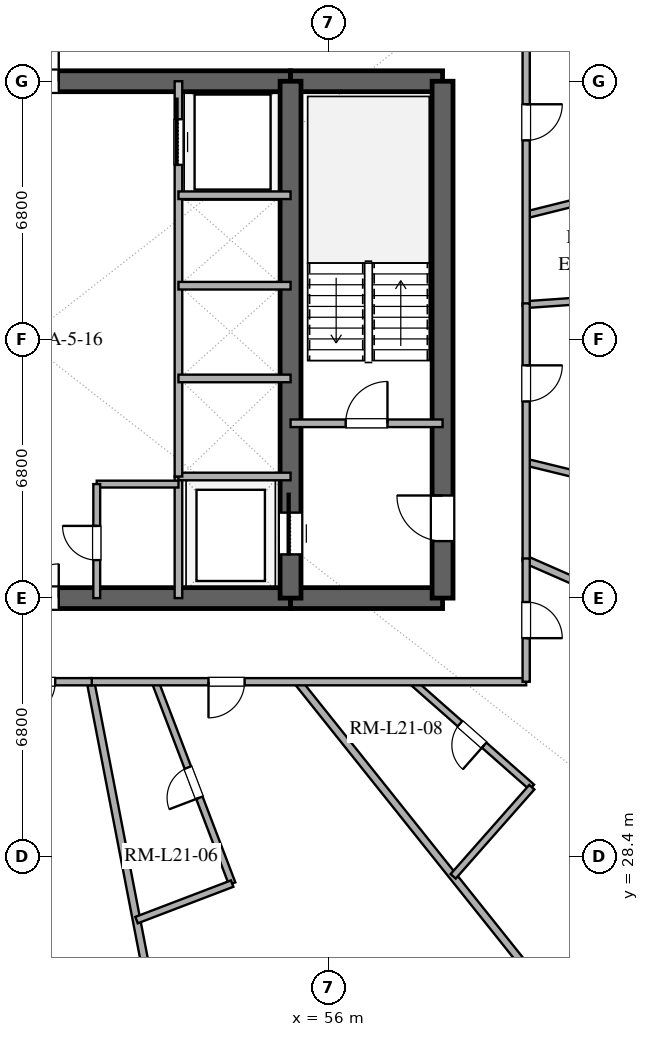
"""IFC4 building model, lengths in metres.
Left out: names, types, materials, properties, quantities, classifications, styles, units other than length and angle.
Written with IfcOpenShell. Run it as: python <this file> out.ifc"""

import sys

from ifc_helpers import new_model, si_unit, direction, frame, frame_2d, origin, place, context, subcontext, project, spatial, rectangle, extrude, element, fill, save


model = new_model("IFC4")
c1 = context("Model", 3, precision=1e-05, world=origin(), true_north=direction((0.0, 1.0)))
c2 = subcontext(c1, "Body", "Model", "MODEL_VIEW")
j1 = project(units=[si_unit("LENGTHUNIT", "METRE"), si_unit("PLANEANGLEUNIT", "RADIAN")], contexts=[c1])
p1 = place(None, origin())
s1 = spatial("IfcSite", under=j1, at=p1, CompositionType="ELEMENT")
p2 = place(p1, origin())
s2 = spatial("IfcBuilding", under=s1, at=p2, CompositionType="ELEMENT")
p3 = place(p2, frame((0.0, 0.0, 87.6)))
s3 = spatial("IfcBuildingStorey", under=s2, at=p3, CompositionType="ELEMENT", Elevation=87.6)
p4 = place(p3, frame((41.0, 35.2, 0.0), z_axis=(0.0, 0.0, 1.0), x_axis=(1.0, 0.0, 0.0)))
e1 = element("IfcWall", 1, at=p4, inside=s3, PredefinedType="SHEAR", context=c2, shape_type="SweptSolid", body=[
    extrude(rectangle(XDim=14.0, YDim=0.55, at=frame_2d((7.0, 0.0))), origin(), (0.0, 0.0, 1.0), 3.38),
])
p5 = place(p4, frame((6.1, 0.0, 0.0)))
e2 = element("IfcOpeningElement", 2, at=p5, cuts=e1, PredefinedType="OPENING", context=c2, shape_type="SweptSolid", body=[
    extrude(rectangle(XDim=1.8, YDim=2.25, at=frame_2d((0.9, 1.125))), frame((0.0, 0.285, 0.0), z_axis=(0.0, -1.0, 0.0), x_axis=(1.0, 0.0, 0.0)), (0.0, 0.0, 1.0), 0.57),
])
p6 = place(p3, frame((55.0, 35.2, 0.0), z_axis=(0.0, 0.0, 1.0), x_axis=(1.0, 0.0, 0.0)))
e3 = element("IfcWall", 3, at=p6, inside=s3, PredefinedType="SHEAR", context=c2, shape_type="SweptSolid", body=[
    extrude(rectangle(XDim=4.0, YDim=0.55, at=frame_2d((2.0, 0.0))), origin(), (0.0, 0.0, 1.0), 3.38),
])
p7 = place(p3, frame((41.0, 48.8, 0.0), z_axis=(0.0, 0.0, 1.0), x_axis=(1.0, 0.0, 0.0)))
e4 = element("IfcWall", 4, at=p7, inside=s3, PredefinedType="SHEAR", context=c2, shape_type="SweptSolid", body=[
    extrude(rectangle(XDim=14.0, YDim=0.55, at=frame_2d((7.0, 0.0))), origin(), (0.0, 0.0, 1.0), 3.38),
])
p8 = place(p7, frame((6.1, 0.0, 0.0)))
e5 = element("IfcOpeningElement", 5, at=p8, cuts=e4, PredefinedType="OPENING", context=c2, shape_type="SweptSolid", body=[
    extrude(rectangle(XDim=1.8, YDim=2.25, at=frame_2d((0.9, 1.125))), frame((0.0, 0.285, 0.0), z_axis=(0.0, -1.0, 0.0), x_axis=(1.0, 0.0, 0.0)), (0.0, 0.0, 1.0), 0.57),
])
p9 = place(p3, frame((55.0, 48.8, 0.0), z_axis=(0.0, 0.0, 1.0), x_axis=(1.0, 0.0, 0.0)))
e6 = element("IfcWall", 6, at=p9, inside=s3, PredefinedType="SHEAR", context=c2, shape_type="SweptSolid", body=[
    extrude(rectangle(XDim=4.0, YDim=0.55, at=frame_2d((2.0, 0.0))), origin(), (0.0, 0.0, 1.0), 3.38),
])
p10 = place(p3, frame((59.0, 35.2, 0.0), z_axis=(0.0, 0.0, 1.0), x_axis=(0.0, 1.0, 0.0)))
e7 = element("IfcWall", 7, at=p10, inside=s3, PredefinedType="SHEAR", context=c2, shape_type="SweptSolid", body=[
    extrude(rectangle(XDim=13.6, YDim=0.55, at=frame_2d((6.8, 0.0))), origin(), (0.0, 0.0, 1.0), 3.38),
])
p11 = place(p10, frame((1.5, 0.0, 0.0)))
e8 = element("IfcOpeningElement", 8, at=p11, cuts=e7, PredefinedType="OPENING", context=c2, shape_type="SweptSolid", body=[
    extrude(rectangle(XDim=1.2, YDim=2.15, at=frame_2d((0.6, 1.075))), frame((0.0, 0.285, 0.0), z_axis=(0.0, -1.0, 0.0), x_axis=(1.0, 0.0, 0.0)), (0.0, 0.0, 1.0), 0.57),
])
p12 = place(p3, frame((55.0, 35.2, 0.0), z_axis=(0.0, 0.0, 1.0), x_axis=(0.0, 1.0, 0.0)))
e9 = element("IfcWall", 9, at=p12, inside=s3, PredefinedType="SHEAR", context=c2, shape_type="SweptSolid", body=[
    extrude(rectangle(XDim=13.6, YDim=0.55, at=frame_2d((6.8, 0.0))), origin(), (0.0, 0.0, 1.0), 3.38),
])
p13 = place(p12, frame((1.15, 0.0, 0.0)))
e10 = element("IfcOpeningElement", 10, at=p13, cuts=e9, PredefinedType="OPENING", context=c2, shape_type="SweptSolid", body=[
    extrude(rectangle(XDim=1.1, YDim=2.2, at=frame_2d((0.55, 1.1))), frame((0.0, 0.285, 0.0), z_axis=(0.0, -1.0, 0.0), x_axis=(1.0, 0.0, 0.0)), (0.0, 0.0, 1.0), 0.57),
])
p14 = place(p3, frame((55.0, 39.8, 0.0), z_axis=(0.0, 0.0, 1.0), x_axis=(1.0, 0.0, 0.0)))
e11 = element("IfcWall", 11, at=p14, inside=s3, PredefinedType="SOLIDWALL", context=c2, shape_type="SweptSolid", body=[
    extrude(rectangle(XDim=4.0, YDim=0.2, at=frame_2d((2.0, 0.0))), origin(), (0.0, 0.0, 1.0), 2.74),
])
p15 = place(p14, frame((1.45, 0.0, 0.0)))
e12 = element("IfcOpeningElement", 12, at=p15, cuts=e11, PredefinedType="OPENING", context=c2, shape_type="SweptSolid", body=[
    extrude(rectangle(XDim=1.1, YDim=2.15, at=frame_2d((0.55, 1.075))), frame((0.0, 0.11, 0.0), z_axis=(0.0, -1.0, 0.0), x_axis=(1.0, 0.0, 0.0)), (0.0, 0.0, 1.0), 0.22),
])
p16 = place(p3, frame((52.05, 35.2, 0.0), z_axis=(0.0, 0.0, 1.0), x_axis=(0.0, 1.0, 0.0)))
e13 = element("IfcWall", 13, at=p16, inside=s3, PredefinedType="SOLIDWALL", context=c2, shape_type="SweptSolid", body=[
    extrude(rectangle(XDim=3.2, YDim=0.2, at=frame_2d((1.6, 0.0))), origin(), (0.0, 0.0, 1.0), 2.74),
])
p17 = place(p3, frame((52.05, 38.4, 0.0), z_axis=(0.0, 0.0, 1.0), x_axis=(1.0, 0.0, 0.0)))
e14 = element("IfcWall", 14, at=p17, inside=s3, PredefinedType="SOLIDWALL", context=c2, shape_type="SweptSolid", body=[
    extrude(rectangle(XDim=2.95, YDim=0.2, at=frame_2d((1.475, 0.0))), origin(), (0.0, 0.0, 1.0), 2.74),
])
p18 = place(p3, frame((52.05, 38.4, 0.0), z_axis=(0.0, 0.0, 1.0), x_axis=(0.0, 1.0, 0.0)))
e15 = element("IfcWall", 15, at=p18, inside=s3, PredefinedType="SOLIDWALL", context=c2, shape_type="SweptSolid", body=[
    extrude(rectangle(XDim=10.4, YDim=0.2, at=frame_2d((5.2, 0.0))), origin(), (0.0, 0.0, 1.0), 2.74),
])
p19 = place(p18, frame((8.2, 0.0, 0.0)))
e16 = element("IfcOpeningElement", 16, at=p19, cuts=e15, PredefinedType="OPENING", context=c2, shape_type="SweptSolid", body=[
    extrude(rectangle(XDim=1.2, YDim=2.2, at=frame_2d((0.6, 1.1))), frame((0.0, 0.11, 0.0), z_axis=(0.0, -1.0, 0.0), x_axis=(1.0, 0.0, 0.0)), (0.0, 0.0, 1.0), 0.22),
])
for number, where, z_axis, x_axis in (
    (17, (52.05, 40.98, 0.0), (0.0, 0.0, 1.0), (1.0, 0.0, 0.0)),
    (18, (52.05, 43.42, 0.0), (0.0, 0.0, 1.0), (1.0, 0.0, 0.0)),
    (19, (52.05, 45.8, 0.0), (0.0, 0.0, 1.0), (1.0, 0.0, 0.0)),
):
    element("IfcWall", number, at=place(p3, frame(where, z_axis=z_axis, x_axis=x_axis)), inside=s3, PredefinedType="SOLIDWALL", context=c2, shape_type="SweptSolid", body=[
        extrude(rectangle(XDim=2.95, YDim=0.2, at=frame_2d((1.475, 0.0))), origin(), (0.0, 0.0, 1.0), 2.74),
    ])
p20 = place(p3, frame((49.9, 38.2, 0.0), z_axis=(0.0, 0.0, 1.0), x_axis=(1.0, 0.0, 0.0)))
e20 = element("IfcWall", 20, at=p20, inside=s3, PredefinedType="PLUMBINGWALL", context=c2, shape_type="SweptSolid", body=[
    extrude(rectangle(XDim=2.15, YDim=0.18, at=frame_2d((1.075, 0.0))), origin(), (0.0, 0.0, 1.0), 2.74),
])
p21 = place(p3, frame((49.9, 35.2, 0.0), z_axis=(0.0, 0.0, 1.0), x_axis=(0.0, 1.0, 0.0)))
e21 = element("IfcWall", 21, at=p21, inside=s3, PredefinedType="PLUMBINGWALL", context=c2, shape_type="SweptSolid", body=[
    extrude(rectangle(XDim=3.0, YDim=0.18, at=frame_2d((1.5, 0.0))), origin(), (0.0, 0.0, 1.0), 2.74),
])
p22 = place(p21, frame((1.0, 0.0, 0.0)))
e22 = element("IfcOpeningElement", 22, at=p22, cuts=e21, PredefinedType="OPENING", context=c2, shape_type="SweptSolid", body=[
    extrude(rectangle(XDim=0.9, YDim=2.1, at=frame_2d((0.45, 1.05))), frame((0.0, 0.1, 0.0), z_axis=(0.0, -1.0, 0.0), x_axis=(1.0, 0.0, 0.0)), (0.0, 0.0, 1.0), 0.2),
])
p23 = place(p3, frame((68.224, 43.414, 0.0), z_axis=(0.0, 0.0, 1.0), x_axis=(-0.997563891584, -0.06975874287, 0.0)))
e23 = element("IfcWall", 23, at=p23, inside=s3, PredefinedType="PLUMBINGWALL", context=c2, shape_type="SweptSolid", body=[
    extrude(rectangle(XDim=7.042, YDim=0.18, at=frame_2d((3.521, 0.0))), origin(), (0.0, 0.0, 1.0), 2.74),
])
p24 = place(p3, frame((49.737, 33.0, 0.0), z_axis=(0.0, 0.0, 1.0), x_axis=(0.18949034594, -0.981882584017, 0.0)))
e24 = element("IfcWall", 24, at=p24, inside=s3, PredefinedType="PARTITIONING", context=c2, shape_type="SweptSolid", body=[
    extrude(rectangle(XDim=13.153, YDim=0.2, at=frame_2d((6.577, 0.0))), origin(), (0.0, 0.0, 1.0), 2.74),
])
p25 = place(p3, frame((61.2, 36.208, 0.0), z_axis=(0.0, 0.0, 1.0), x_axis=(0.915722078144, -0.401812239235, 0.0)))
e25 = element("IfcWall", 25, at=p25, inside=s3, PredefinedType="PARTITIONING", context=c2, shape_type="SweptSolid", body=[
    extrude(rectangle(XDim=12.915, YDim=0.2, at=frame_2d((6.458, 0.0))), origin(), (0.0, 0.0, 1.0), 2.74),
])
p26 = place(p3, frame((67.699, 37.189, 0.0), z_axis=(0.0, 0.0, 1.0), x_axis=(-0.971448370468, 0.237251055878, 0.0)))
e26 = element("IfcWall", 26, at=p26, inside=s3, PredefinedType="PLUMBINGWALL", context=c2, shape_type="SweptSolid", body=[
    extrude(rectangle(XDim=6.69, YDim=0.18, at=frame_2d((3.345, 0.0))), origin(), (0.0, 0.0, 1.0), 2.74),
])
p27 = place(p26, frame((2.92, 0.0, 0.0)))
e27 = element("IfcOpeningElement", 27, at=p27, cuts=e26, PredefinedType="OPENING", context=c2, shape_type="SweptSolid", body=[
    extrude(rectangle(XDim=0.85, YDim=2.1, at=frame_2d((0.425, 1.05))), frame((0.0, 0.1, 0.0), z_axis=(0.0, -1.0, 0.0), x_axis=(1.0, 0.0, 0.0)), (0.0, 0.0, 1.0), 0.2),
])
p28 = place(p3, frame((55.189, 33.0, 0.0), z_axis=(0.0, 0.0, 1.0), x_axis=(0.624085468444, -0.781356082767, 0.0)))
e28 = element("IfcWall", 28, at=p28, inside=s3, PredefinedType="PARTITIONING", context=c2, shape_type="SweptSolid", body=[
    extrude(rectangle(XDim=12.703, YDim=0.2, at=frame_2d((6.352, 0.0))), origin(), (0.0, 0.0, 1.0), 2.74),
])
p29 = place(p3, frame((61.2, 45.284, 0.0), z_axis=(0.0, 0.0, 1.0), x_axis=(0.970426102609, 0.241398383125, 0.0)))
e29 = element("IfcWall", 29, at=p29, inside=s3, PredefinedType="PLUMBINGWALL", context=c2, shape_type="SweptSolid", body=[
    extrude(rectangle(XDim=6.365, YDim=0.18, at=frame_2d((3.183, 0.0))), origin(), (0.0, 0.0, 1.0), 2.74),
])
p30 = place(p29, frame((2.758, 0.0, 0.0)))
e30 = element("IfcOpeningElement", 30, at=p30, cuts=e29, PredefinedType="OPENING", context=c2, shape_type="SweptSolid", body=[
    extrude(rectangle(XDim=0.85, YDim=2.1, at=frame_2d((0.425, 1.05))), frame((0.0, 0.1, 0.0), z_axis=(0.0, -1.0, 0.0), x_axis=(1.0, 0.0, 0.0)), (0.0, 0.0, 1.0), 0.2),
])
p31 = place(p3, frame((53.463, 27.688, 0.0), z_axis=(0.0, 0.0, 1.0), x_axis=(-0.356604128264, 0.934255583716, 0.0)))
e31 = element("IfcWall", 31, at=p31, inside=s3, PredefinedType="PLUMBINGWALL", context=c2, shape_type="SweptSolid", body=[
    extrude(rectangle(XDim=5.686, YDim=0.18, at=frame_2d((2.843, 0.0))), origin(), (0.0, 0.0, 1.0), 2.74),
])
p32 = place(p31, frame((2.418, 0.0, 0.0)))
e32 = element("IfcOpeningElement", 32, at=p32, cuts=e31, PredefinedType="OPENING", context=c2, shape_type="SweptSolid", body=[
    extrude(rectangle(XDim=0.85, YDim=2.1, at=frame_2d((0.425, 1.05))), frame((0.0, 0.1, 0.0), z_axis=(0.0, -1.0, 0.0), x_axis=(1.0, 0.0, 0.0)), (0.0, 0.0, 1.0), 0.2),
])
p33 = place(p3, frame((61.2, 51.0, 0.0), z_axis=(0.0, 0.0, 1.0), x_axis=(0.0, -1.0, 0.0)))
e33 = element("IfcWall", 33, at=p33, inside=s3, PredefinedType="PARTITIONING", context=c2, shape_type="SweptSolid", body=[
    extrude(rectangle(XDim=8.109, YDim=0.19, at=frame_2d((4.055, 0.0))), origin(), (0.0, 0.0, 1.0), 2.74),
])
p34 = place(p33, frame((2.806, 0.0, 0.0)))
e34 = element("IfcOpeningElement", 34, at=p34, cuts=e33, PredefinedType="OPENING", context=c2, shape_type="SweptSolid", body=[
    extrude(rectangle(XDim=0.95, YDim=2.15, at=frame_2d((0.475, 1.075))), frame((0.0, 0.105, 0.0), z_axis=(0.0, -1.0, 0.0), x_axis=(1.0, 0.0, 0.0)), (0.0, 0.0, 1.0), 0.21),
])
p35 = place(p3, frame((61.2, 42.955, 0.0), z_axis=(0.0, 0.0, 1.0), x_axis=(0.0, -1.0, 0.0)))
e35 = element("IfcWall", 35, at=p35, inside=s3, PredefinedType="PARTITIONING", context=c2, shape_type="SweptSolid", body=[
    extrude(rectangle(XDim=6.782, YDim=0.19, at=frame_2d((3.391, 0.0))), origin(), (0.0, 0.0, 1.0), 2.74),
])
p36 = place(p35, frame((1.631, 0.0, 0.0)))
e36 = element("IfcOpeningElement", 36, at=p36, cuts=e35, PredefinedType="OPENING", context=c2, shape_type="SweptSolid", body=[
    extrude(rectangle(XDim=0.95, YDim=2.15, at=frame_2d((0.475, 1.075))), frame((0.0, 0.105, 0.0), z_axis=(0.0, -1.0, 0.0), x_axis=(1.0, 0.0, 0.0)), (0.0, 0.0, 1.0), 0.21),
])
p37 = place(p3, frame((61.348, 30.225, 0.0), z_axis=(0.0, 0.0, 1.0), x_axis=(-0.749931272561, 0.661515749197, 0.0)))
e37 = element("IfcWall", 37, at=p37, inside=s3, PredefinedType="PLUMBINGWALL", context=c2, shape_type="SweptSolid", body=[
    extrude(rectangle(XDim=4.194, YDim=0.18, at=frame_2d((2.097, 0.0))), origin(), (0.0, 0.0, 1.0), 2.74),
])
p38 = place(p37, frame((1.672, 0.0, 0.0)))
e38 = element("IfcOpeningElement", 38, at=p38, cuts=e37, PredefinedType="OPENING", context=c2, shape_type="SweptSolid", body=[
    extrude(rectangle(XDim=0.85, YDim=2.1, at=frame_2d((0.425, 1.05))), frame((0.0, 0.1, 0.0), z_axis=(0.0, -1.0, 0.0), x_axis=(1.0, 0.0, 0.0)), (0.0, 0.0, 1.0), 0.2),
])
p39 = place(p3, frame((61.2, 33.0, 0.0), z_axis=(0.0, 0.0, 1.0), x_axis=(-1.0, 0.0, 0.0)))
e39 = element("IfcWall", 39, at=p39, inside=s3, PredefinedType="PARTITIONING", context=c2, shape_type="SweptSolid", body=[
    extrude(rectangle(XDim=11.496, YDim=0.19, at=frame_2d((5.748, 0.0))), origin(), (0.0, 0.0, 1.0), 2.74),
])
p40 = place(p39, frame((7.41, 0.0, 0.0)))
e40 = element("IfcOpeningElement", 40, at=p40, cuts=e39, PredefinedType="OPENING", context=c2, shape_type="SweptSolid", body=[
    extrude(rectangle(XDim=0.95, YDim=2.15, at=frame_2d((0.475, 1.075))), frame((0.0, 0.105, 0.0), z_axis=(0.0, -1.0, 0.0), x_axis=(1.0, 0.0, 0.0)), (0.0, 0.0, 1.0), 0.21),
])
p41 = place(p3, frame((61.2, 36.243, 0.0), z_axis=(0.0, 0.0, 1.0), x_axis=(0.0, -1.0, 0.0)))
e41 = element("IfcWall", 41, at=p41, inside=s3, PredefinedType="PARTITIONING", context=c2, shape_type="SweptSolid", body=[
    extrude(rectangle(XDim=3.243, YDim=0.19, at=frame_2d((1.621, 0.0))), origin(), (0.0, 0.0, 1.0), 2.74),
])
p42 = place(p41, frame((1.146, 0.0, 0.0)))
e42 = element("IfcOpeningElement", 42, at=p42, cuts=e41, PredefinedType="OPENING", context=c2, shape_type="SweptSolid", body=[
    extrude(rectangle(XDim=0.95, YDim=2.15, at=frame_2d((0.475, 1.075))), frame((0.0, 0.105, 0.0), z_axis=(0.0, -1.0, 0.0), x_axis=(1.0, 0.0, 0.0)), (0.0, 0.0, 1.0), 0.21),
])
p43 = place(p3, frame((59.279, 27.879, 0.0), z_axis=(0.0, 0.0, 1.0), x_axis=(0.661515810511, 0.749931218475, 0.0)))
e43 = element("IfcWall", 43, at=p43, inside=s3, PredefinedType="PLUMBINGWALL", context=c2, shape_type="SweptSolid", body=[
    extrude(rectangle(XDim=3.129, YDim=0.18, at=frame_2d((1.564, 0.0))), origin(), (0.0, 0.0, 1.0), 2.74),
])
p44 = place(p3, frame((49.77, 33.0, 0.0), z_axis=(0.0, 0.0, 1.0), x_axis=(-1.0, 0.0, 0.0)))
e44 = element("IfcWall", 44, at=p44, inside=s3, PredefinedType="PARTITIONING", context=c2, shape_type="SweptSolid", body=[
    extrude(rectangle(XDim=2.875, YDim=0.19, at=frame_2d((1.438, 0.0))), origin(), (0.0, 0.0, 1.0), 2.74),
])
p45 = place(p44, frame((0.962, 0.0, 0.0)))
e45 = element("IfcOpeningElement", 45, at=p45, cuts=e44, PredefinedType="OPENING", context=c2, shape_type="SweptSolid", body=[
    extrude(rectangle(XDim=0.95, YDim=2.15, at=frame_2d((0.475, 1.075))), frame((0.0, 0.105, 0.0), z_axis=(0.0, -1.0, 0.0), x_axis=(1.0, 0.0, 0.0)), (0.0, 0.0, 1.0), 0.21),
])
p46 = place(p3, frame((50.948, 26.728, 0.0), z_axis=(0.0, 0.0, 1.0), x_axis=(0.934244754769, 0.35663249738, 0.0)))
e46 = element("IfcWall", 46, at=p46, inside=s3, PredefinedType="PLUMBINGWALL", context=c2, shape_type="SweptSolid", body=[
    extrude(rectangle(XDim=2.692, YDim=0.18, at=frame_2d((1.346, 0.0))), origin(), (0.0, 0.0, 1.0), 2.74),
])
p47 = place(p13, origin())
e47 = element("IfcDoor", 47, at=p47, inside=s3, OperationType="SLIDING_TO_RIGHT", PredefinedType="DOOR", context=c2, shape_type="SweptSolid", body=[
    extrude(rectangle(XDim=1.1, YDim=2.2, at=frame_2d((0.55, 1.1))), frame((0.0, 0.025, 0.0), z_axis=(0.0, -1.0, 0.0), x_axis=(1.0, 0.0, 0.0)), (0.0, 0.0, 1.0), 0.05),
])
fill(e10, e47)
p48 = place(p11, origin())
e48 = element("IfcDoor", 48, at=p48, inside=s3, OperationType="SINGLE_SWING_RIGHT", PredefinedType="DOOR", context=c2, shape_type="SweptSolid", body=[
    extrude(rectangle(XDim=1.2, YDim=2.15, at=frame_2d((0.6, 1.075))), frame((0.0, 0.025, 0.0), z_axis=(0.0, -1.0, 0.0), x_axis=(1.0, 0.0, 0.0)), (0.0, 0.0, 1.0), 0.05),
])
fill(e8, e48)
p49 = place(p5, origin())
e49 = element("IfcDoor", 49, at=p49, inside=s3, OperationType="DOUBLE_DOOR_SINGLE_SWING", PredefinedType="DOOR", context=c2, shape_type="SweptSolid", body=[
    extrude(rectangle(XDim=1.8, YDim=2.25, at=frame_2d((0.9, 1.125))), frame((0.0, 0.025, 0.0), z_axis=(0.0, -1.0, 0.0), x_axis=(1.0, 0.0, 0.0)), (0.0, 0.0, 1.0), 0.05),
])
fill(e2, e49)
p50 = place(p8, origin())
e50 = element("IfcDoor", 50, at=p50, inside=s3, OperationType="DOUBLE_DOOR_SINGLE_SWING", PredefinedType="DOOR", context=c2, shape_type="SweptSolid", body=[
    extrude(rectangle(XDim=1.8, YDim=2.25, at=frame_2d((0.9, 1.125))), frame((0.0, 0.025, 0.0), z_axis=(0.0, -1.0, 0.0), x_axis=(1.0, 0.0, 0.0)), (0.0, 0.0, 1.0), 0.05),
])
fill(e5, e50)
p51 = place(p15, origin())
e51 = element("IfcDoor", 51, at=p51, inside=s3, OperationType="SINGLE_SWING_RIGHT", PredefinedType="DOOR", context=c2, shape_type="SweptSolid", body=[
    extrude(rectangle(XDim=1.1, YDim=2.15, at=frame_2d((0.55, 1.075))), frame((0.0, 0.025, 0.0), z_axis=(0.0, -1.0, 0.0), x_axis=(1.0, 0.0, 0.0)), (0.0, 0.0, 1.0), 0.05),
])
fill(e12, e51)
p52 = place(p19, origin())
e52 = element("IfcDoor", 52, at=p52, inside=s3, OperationType="SLIDING_TO_RIGHT", PredefinedType="DOOR", context=c2, shape_type="SweptSolid", body=[
    extrude(rectangle(XDim=1.2, YDim=2.2, at=frame_2d((0.6, 1.1))), frame((0.0, 0.025, 0.0), z_axis=(0.0, -1.0, 0.0), x_axis=(1.0, 0.0, 0.0)), (0.0, 0.0, 1.0), 0.05),
])
fill(e16, e52)
p53 = place(p22, origin())
e53 = element("IfcDoor", 53, at=p53, inside=s3, OperationType="SINGLE_SWING_RIGHT", PredefinedType="DOOR", context=c2, shape_type="SweptSolid", body=[
    extrude(rectangle(XDim=0.9, YDim=2.1, at=frame_2d((0.45, 1.05))), frame((0.0, 0.025, 0.0), z_axis=(0.0, -1.0, 0.0), x_axis=(1.0, 0.0, 0.0)), (0.0, 0.0, 1.0), 0.05),
])
fill(e22, e53)
p54 = place(p32, origin())
e54 = element("IfcDoor", 54, at=p54, inside=s3, OperationType="SINGLE_SWING_LEFT", PredefinedType="DOOR", context=c2, shape_type="SweptSolid", body=[
    extrude(rectangle(XDim=0.85, YDim=2.1, at=frame_2d((0.425, 1.05))), frame((0.0, 0.025, 0.0), z_axis=(0.0, -1.0, 0.0), x_axis=(1.0, 0.0, 0.0)), (0.0, 0.0, 1.0), 0.05),
])
fill(e32, e54)
p55 = place(p34, origin())
e55 = element("IfcDoor", 55, at=p55, inside=s3, OperationType="SINGLE_SWING_LEFT", PredefinedType="DOOR", context=c2, shape_type="SweptSolid", body=[
    extrude(rectangle(XDim=0.95, YDim=2.15, at=frame_2d((0.475, 1.075))), frame((0.0, 0.025, 0.0), z_axis=(0.0, -1.0, 0.0), x_axis=(1.0, 0.0, 0.0)), (0.0, 0.0, 1.0), 0.05),
])
fill(e34, e55)
p56 = place(p36, origin())
e56 = element("IfcDoor", 56, at=p56, inside=s3, OperationType="SINGLE_SWING_LEFT", PredefinedType="DOOR", context=c2, shape_type="SweptSolid", body=[
    extrude(rectangle(XDim=0.95, YDim=2.15, at=frame_2d((0.475, 1.075))), frame((0.0, 0.025, 0.0), z_axis=(0.0, -1.0, 0.0), x_axis=(1.0, 0.0, 0.0)), (0.0, 0.0, 1.0), 0.05),
])
fill(e36, e56)
p57 = place(p38, origin())
e57 = element("IfcDoor", 57, at=p57, inside=s3, OperationType="SINGLE_SWING_LEFT", PredefinedType="DOOR", context=c2, shape_type="SweptSolid", body=[
    extrude(rectangle(XDim=0.85, YDim=2.1, at=frame_2d((0.425, 1.05))), frame((0.0, 0.025, 0.0), z_axis=(0.0, -1.0, 0.0), x_axis=(1.0, 0.0, 0.0)), (0.0, 0.0, 1.0), 0.05),
])
fill(e38, e57)
p58 = place(p40, origin())
e58 = element("IfcDoor", 58, at=p58, inside=s3, OperationType="SINGLE_SWING_RIGHT", PredefinedType="DOOR", context=c2, shape_type="SweptSolid", body=[
    extrude(rectangle(XDim=0.95, YDim=2.15, at=frame_2d((0.475, 1.075))), frame((0.0, 0.025, 0.0), z_axis=(0.0, -1.0, 0.0), x_axis=(1.0, 0.0, 0.0)), (0.0, 0.0, 1.0), 0.05),
])
fill(e40, e58)
p59 = place(p42, origin())
e59 = element("IfcDoor", 59, at=p59, inside=s3, OperationType="SINGLE_SWING_RIGHT", PredefinedType="DOOR", context=c2, shape_type="SweptSolid", body=[
    extrude(rectangle(XDim=0.95, YDim=2.15, at=frame_2d((0.475, 1.075))), frame((0.0, 0.025, 0.0), z_axis=(0.0, -1.0, 0.0), x_axis=(1.0, 0.0, 0.0)), (0.0, 0.0, 1.0), 0.05),
])
fill(e42, e59)
p60 = place(p45, origin())
e60 = element("IfcDoor", 60, at=p60, inside=s3, OperationType="SINGLE_SWING_RIGHT", PredefinedType="DOOR", context=c2, shape_type="SweptSolid", body=[
    extrude(rectangle(XDim=0.95, YDim=2.15, at=frame_2d((0.475, 1.075))), frame((0.0, 0.025, 0.0), z_axis=(0.0, -1.0, 0.0), x_axis=(1.0, 0.0, 0.0)), (0.0, 0.0, 1.0), 0.05),
])
fill(e45, e60)
save(model, sys.argv[1])
